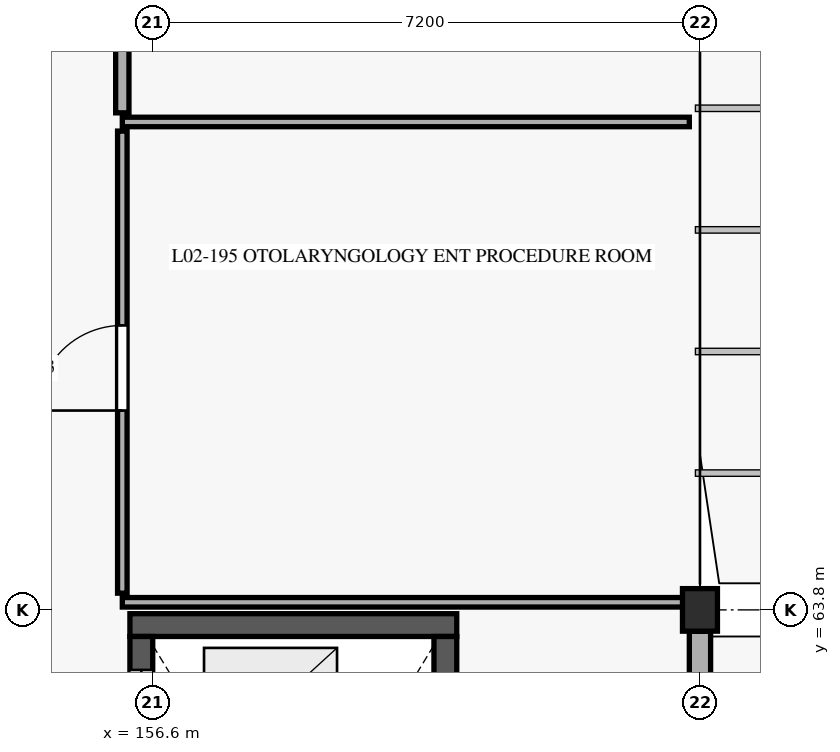
"""IFC4 building model, lengths in metres.
Left out: names, types, materials, properties, quantities, classifications, styles, units other than length and angle.
Written with IfcOpenShell. Run it as: python <this file> out.ifc"""

import sys

from ifc_helpers import new_model, si_unit, direction, frame, frame_2d, origin, origin_with_axes, origin_2d, place, context, subcontext, project, spatial, rectangle, extrude, element, fill, save


model = new_model("IFC4")
c1 = context("Model", 3, precision=1e-05, world=origin(), true_north=direction((0.0, 1.0)))
c2 = subcontext(c1, "Body", "Model", "MODEL_VIEW")
j1 = project(units=[si_unit("LENGTHUNIT", "METRE"), si_unit("PLANEANGLEUNIT", "RADIAN")], contexts=[c1])
p1 = place(None, origin())
s1 = spatial("IfcSite", under=j1, at=p1, CompositionType="ELEMENT")
p2 = place(p1, origin())
s2 = spatial("IfcBuilding", under=s1, at=p2, CompositionType="ELEMENT")
p3 = place(p2, frame((0.0, 0.0, 4.8)))
s3 = spatial("IfcBuildingStorey", under=s2, at=p3, CompositionType="ELEMENT", Elevation=4.8)
p4 = place(p3, frame((163.8, 63.8, 0.0), z_axis=(0.0, 0.0, 1.0), x_axis=(1.0, 0.0, 0.0)))
e1 = element("IfcColumn", 1, at=p4, inside=s3, PredefinedType="COLUMN", context=c2, shape_type="SweptSolid", body=[
    extrude(rectangle(XDim=0.46, YDim=0.56, at=origin_2d()), origin(), (0.0, 0.0, 1.0), 4.5),
])
p5 = place(p3, frame((160.6, 63.6, 0.0), z_axis=(0.0, 0.0, 1.0), x_axis=(-1.0, 0.0, 0.0)))
e2 = element("IfcWall", 2, at=p5, inside=s3, PredefinedType="SHEAR", context=c2, shape_type="SweptSolid", body=[
    extrude(rectangle(XDim=4.3, YDim=0.3, at=frame_2d((2.15, 0.0))), origin(), (0.0, 0.0, 1.0), 4.2),
])
p6 = place(p3, frame((156.45, 63.45, 0.0), z_axis=(0.0, 0.0, 1.0), x_axis=(0.0, -1.0, 0.0)))
e3 = element("IfcWall", 3, at=p6, inside=s3, PredefinedType="SHEAR", context=c2, shape_type="SweptSolid", body=[
    extrude(rectangle(XDim=13.5, YDim=0.3, at=frame_2d((6.75, 0.0))), origin(), (0.0, 0.0, 1.0), 4.2),
])
p7 = place(p6, frame((12.2, 0.0, 0.0)))
e4 = element("IfcOpeningElement", 4, at=p7, cuts=e3, PredefinedType="OPENING", context=c2, shape_type="SweptSolid", body=[
    extrude(rectangle(XDim=1.1, YDim=2.2, at=frame_2d((0.55, 1.1))), frame((0.0, 0.16, 0.0), z_axis=(0.0, -1.0, 0.0), x_axis=(1.0, 0.0, 0.0)), (0.0, 0.0, 1.0), 0.32),
])
p8 = place(p6, frame((4.475, 0.0, 0.0)))
e5 = element("IfcOpeningElement", 5, at=p8, cuts=e3, PredefinedType="OPENING", context=c2, shape_type="SweptSolid", body=[
    extrude(rectangle(XDim=1.15, YDim=2.2, at=frame_2d((0.575, 1.1))), frame((0.0, 0.16, 0.0), z_axis=(0.0, -1.0, 0.0), x_axis=(1.0, 0.0, 0.0)), (0.0, 0.0, 1.0), 0.32),
])
p9 = place(p6, frame((2.34, 0.0, 0.0)))
e6 = element("IfcOpeningElement", 6, at=p9, cuts=e3, PredefinedType="OPENING", context=c2, shape_type="SweptSolid", body=[
    extrude(rectangle(XDim=1.02, YDim=2.15, at=frame_2d((0.51, 1.075))), frame((0.0, 0.16, 0.0), z_axis=(0.0, -1.0, 0.0), x_axis=(1.0, 0.0, 0.0)), (0.0, 0.0, 1.0), 0.32),
])
p10 = place(p6, frame((0.44, 0.0, 0.0)))
e7 = element("IfcOpeningElement", 7, at=p10, cuts=e3, PredefinedType="OPENING", context=c2, shape_type="SweptSolid", body=[
    extrude(rectangle(XDim=1.02, YDim=2.15, at=frame_2d((0.51, 1.075))), frame((0.0, 0.16, 0.0), z_axis=(0.0, -1.0, 0.0), x_axis=(1.0, 0.0, 0.0)), (0.0, 0.0, 1.0), 0.32),
])
p11 = place(p3, frame((160.45, 49.95, 0.0), z_axis=(0.0, 0.0, 1.0), x_axis=(0.0, 1.0, 0.0)))
e8 = element("IfcWall", 8, at=p11, inside=s3, PredefinedType="SHEAR", context=c2, shape_type="SweptSolid", body=[
    extrude(rectangle(XDim=13.5, YDim=0.3, at=frame_2d((6.75, 0.0))), origin(), (0.0, 0.0, 1.0), 4.2),
])
p12 = place(p3, frame((163.8, 55.682, 0.0), z_axis=(0.0, 0.0, 1.0), x_axis=(0.0, 1.0, 0.0)))
e9 = element("IfcWall", 9, at=p12, inside=s3, PredefinedType="SOLIDWALL", context=c2, shape_type="SweptSolid", body=[
    extrude(rectangle(XDim=7.836, YDim=0.28, at=frame_2d((3.918, 0.0))), origin(), (0.0, 0.0, 1.0), 3.65),
])
p13 = place(p12, frame((1.812, 0.0, 0.88)))
e10 = element("IfcOpeningElement", 10, at=p13, cuts=e9, PredefinedType="OPENING", context=c2, shape_type="SweptSolid", body=[
    extrude(rectangle(XDim=1.6, YDim=2.05, at=frame_2d((0.8, 1.025))), frame((0.0, 0.15, 0.0), z_axis=(0.0, -1.0, 0.0), x_axis=(1.0, 0.0, 0.0)), (0.0, 0.0, 1.0), 0.3),
])
p14 = place(p12, frame((4.174, 0.0, 0.88)))
e11 = element("IfcOpeningElement", 11, at=p14, cuts=e9, PredefinedType="OPENING", context=c2, shape_type="SweptSolid", body=[
    extrude(rectangle(XDim=2.1, YDim=2.2, at=frame_2d((1.05, 1.1))), frame((0.0, 0.15, 0.0), z_axis=(0.0, -1.0, 0.0), x_axis=(1.0, 0.0, 0.0)), (0.0, 0.0, 1.0), 0.3),
])
p15 = place(p3, frame((156.2, 64.02, 0.0), z_axis=(0.0, 0.0, 1.0), x_axis=(0.0, 1.0, 0.0)))
e12 = element("IfcWall", 12, at=p15, inside=s3, PredefinedType="PARTITIONING", context=c2, shape_type="SweptSolid", body=[
    extrude(rectangle(XDim=6.08, YDim=0.125, at=frame_2d((3.04, 0.0))), origin(), (0.0, 0.0, 1.0), 3.795),
])
p16 = place(p15, frame((2.403, 0.0, 0.0)))
e13 = element("IfcOpeningElement", 13, at=p16, cuts=e12, PredefinedType="OPENING", context=c2, shape_type="SweptSolid", body=[
    extrude(rectangle(XDim=1.12, YDim=2.2, at=frame_2d((0.56, 1.1))), frame((0.0, 0.073, 0.0), z_axis=(0.0, -1.0, 0.0), x_axis=(1.0, 0.0, 0.0)), (0.0, 0.0, 1.0), 0.145),
])
p17 = place(p3, frame((156.2, 63.9, 0.0), z_axis=(0.0, 0.0, 1.0), x_axis=(1.0, 0.0, 0.0)))
e14 = element("IfcWall", 14, at=p17, inside=s3, PredefinedType="PARTITIONING", context=c2, shape_type="SweptSolid", body=[
    extrude(rectangle(XDim=7.46, YDim=0.125, at=frame_2d((3.73, 0.0))), origin(), (0.0, 0.0, 1.0), 3.795),
])
p18 = place(p3, frame((156.2, 70.22, 0.0), z_axis=(0.0, 0.0, 1.0), x_axis=(1.0, 0.0, 0.0)))
e15 = element("IfcWall", 15, at=p18, inside=s3, PredefinedType="PARTITIONING", context=c2, shape_type="SweptSolid", body=[
    extrude(rectangle(XDim=7.46, YDim=0.125, at=frame_2d((3.73, 0.0))), origin(), (0.0, 0.0, 1.0), 3.645),
])
p19 = place(p3, frame((156.2, 70.34, 0.0), z_axis=(0.0, 0.0, 1.0), x_axis=(0.0, 1.0, 0.0)))
e16 = element("IfcWall", 16, at=p19, inside=s3, PredefinedType="PARTITIONING", context=c2, shape_type="SweptSolid", body=[
    extrude(rectangle(XDim=7.91, YDim=0.175, at=frame_2d((3.955, 0.0))), origin(), (0.0, 0.0, 1.0), 4.195),
])
p20 = place(p19, frame((3.465, 0.0, 0.0)))
e17 = element("IfcOpeningElement", 17, at=p20, cuts=e16, PredefinedType="OPENING", context=c2, shape_type="SweptSolid", body=[
    extrude(rectangle(XDim=0.98, YDim=2.12, at=frame_2d((0.49, 1.06))), frame((0.0, 0.098, 0.0), z_axis=(0.0, -1.0, 0.0), x_axis=(1.0, 0.0, 0.0)), (0.0, 0.0, 1.0), 0.195),
])
p21 = place(p10, origin_with_axes())
e18 = element("IfcDoor", 18, at=p21, inside=s3, OperationType="SLIDING_TO_LEFT", PredefinedType="DOOR", context=c2, shape_type="SweptSolid", body=[
    extrude(rectangle(XDim=1.02, YDim=2.15, at=frame_2d((0.51, 1.075))), frame((0.0, 0.025, 0.0), z_axis=(0.0, -1.0, 0.0), x_axis=(1.0, 0.0, 0.0)), (0.0, 0.0, 1.0), 0.05),
])
fill(e7, e18)
p22 = place(p16, frame((1.12, 0.0, 0.0), z_axis=(0.0, 0.0, 1.0), x_axis=(-1.0, 0.0, 0.0)))
e19 = element("IfcDoor", 19, at=p22, inside=s3, OperationType="SINGLE_SWING_RIGHT", PredefinedType="DOOR", context=c2, shape_type="SweptSolid", body=[
    extrude(rectangle(XDim=1.12, YDim=2.2, at=frame_2d((0.56, 1.1))), frame((0.0, 0.025, 0.0), z_axis=(0.0, -1.0, 0.0), x_axis=(1.0, 0.0, 0.0)), (0.0, 0.0, 1.0), 0.05),
])
fill(e13, e19)
save(model, sys.argv[1])
